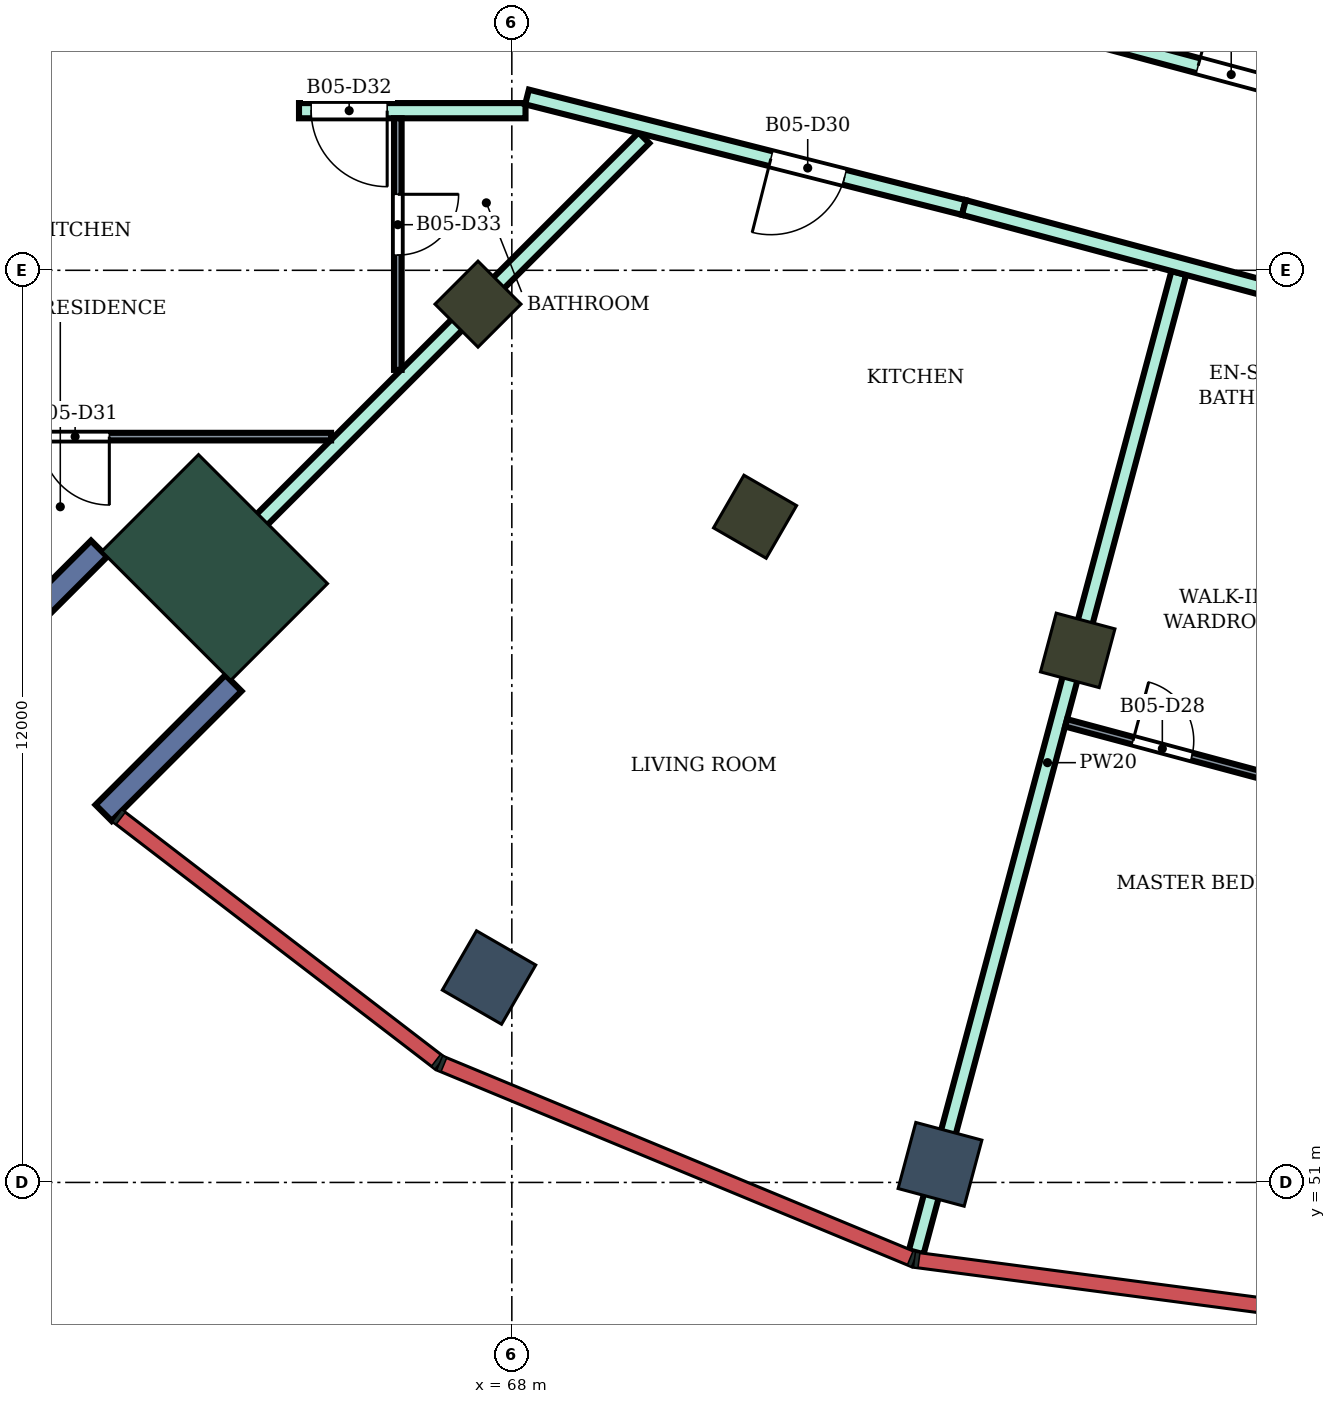
"""IFC4 building model, lengths in metres.
Left out: names, types, materials, properties, quantities, classifications, styles, units other than length and angle.
Written with IfcOpenShell. Run it as: python <this file> out.ifc"""

import sys

from ifc_helpers import new_model, si_unit, direction, frame, frame_2d, origin, origin_2d, place, context, subcontext, project, spatial, rectangle, extrude, element, fill, save


model = new_model("IFC4")
c1 = context("Model", 3, precision=1e-05, world=origin(), true_north=direction((0.0, 1.0)))
c2 = subcontext(c1, "Body", "Model", "MODEL_VIEW")
j1 = project(units=[si_unit("LENGTHUNIT", "METRE"), si_unit("PLANEANGLEUNIT", "RADIAN")], contexts=[c1])
p1 = place(None, origin())
s1 = spatial("IfcSite", under=j1, at=p1, CompositionType="ELEMENT")
p2 = place(p1, origin())
s2 = spatial("IfcBuilding", under=s1, at=p2, CompositionType="ELEMENT")
p3 = place(p2, frame((0.0, 0.0, 262.5)))
s3 = spatial("IfcBuildingStorey", under=s2, at=p3, CompositionType="ELEMENT", Elevation=262.5)
for number, where, z_axis, x_axis in (
    (1, (67.7, 53.696, 0.0), (0.0, 0.0, 1.0), (-0.5, -0.866, 0.0)),
    (2, (73.633, 51.238, 0.0), (0.0, 0.0, 1.0), (-0.259, -0.966, 0.0)),
):
    element("IfcColumn", number, at=place(p3, frame(where, z_axis=z_axis, x_axis=x_axis)), inside=s3, PredefinedType="COLUMN", context=c2, shape_type="SweptSolid", body=[
        extrude(rectangle(XDim=0.9, YDim=0.9, at=origin_2d()), origin(), (0.0, 0.0, 1.0), 4.2),
    ])
for number, where, z_axis, x_axis in (
    (3, (67.555, 62.555, 0.0), (0.0, 0.0, 1.0), (-0.707, -0.707, 0.0)),
    (4, (71.2, 59.758, 0.0), (0.0, 0.0, 1.0), (-0.5, -0.866, 0.0)),
    (5, (75.445, 58.0, 0.0), (0.0, 0.0, 1.0), (-0.259, -0.966, 0.0)),
):
    element("IfcColumn", number, at=place(p3, frame(where, z_axis=z_axis, x_axis=x_axis)), inside=s3, PredefinedType="COLUMN", context=c2, shape_type="SweptSolid", body=[
        extrude(rectangle(XDim=0.8, YDim=0.8, at=origin_2d()), origin(), (0.0, 0.0, 1.0), 4.2),
    ])
p4 = place(p3, frame((64.09, 59.09, 0.0), z_axis=(0.0, 0.0, 1.0), x_axis=(-0.707106781187, -0.707106781187, 0.0)))
e6 = element("IfcColumn", 6, at=p4, inside=s3, PredefinedType="COLUMN", context=c2, shape_type="SweptSolid", body=[
    extrude(rectangle(XDim=1.8, YDim=2.4, at=origin_2d()), origin(), (0.0, 0.0, 1.0), 4.2),
])
for number, where, z_axis, x_axis in (
    (7, (62.57, 59.338, 0.0), (0.0, 0.0, 1.0), (-0.707, -0.707, 0.0)),
    (8, (64.338, 57.57, 0.0), (0.0, 0.0, 1.0), (-0.707, -0.707, 0.0)),
):
    element("IfcWall", number, at=place(p3, frame(where, z_axis=z_axis, x_axis=x_axis)), inside=s3, PredefinedType="NOTDEFINED", context=c2, shape_type="SweptSolid", body=[
        extrude(rectangle(XDim=2.416, YDim=0.3, at=frame_2d((1.208, 0.0))), origin(), (0.0, 0.0, 1.0), 4.2),
    ])
p5 = place(p3, frame((63.592, 58.6, 0.0), z_axis=(0.0, 0.0, 1.0), x_axis=(0.707261286313, 0.706952242293, 0.0)))
e9 = element("IfcWall", 9, at=p5, inside=s3, PredefinedType="PARTITIONING", context=c2, shape_type="SweptSolid", body=[
    extrude(rectangle(XDim=8.69, YDim=0.2, at=frame_2d((4.345, 0.0))), origin(), (0.0, 0.0, 1.0), 3.75),
])
p6 = place(p3, frame((65.2, 65.1, 0.0), z_axis=(0.0, 0.0, 1.0), x_axis=(1.0, 0.0, 0.0)))
e10 = element("IfcWall", 10, at=p6, inside=s3, PredefinedType="PARTITIONING", context=c2, shape_type="SweptSolid", body=[
    extrude(rectangle(XDim=2.98, YDim=0.2, at=frame_2d((1.49, 0.0))), origin(), (0.0, 0.0, 1.0), 3.75),
])
p7 = place(p6, frame((0.16, 0.0, 0.0)))
e11 = element("IfcOpeningElement", 11, at=p7, cuts=e10, PredefinedType="OPENING", context=c2, shape_type="SweptSolid", body=[
    extrude(rectangle(XDim=1.0, YDim=2.1, at=frame_2d((0.5, 1.05))), frame((0.0, 0.11, 0.0), z_axis=(0.0, -1.0, 0.0), x_axis=(1.0, 0.0, 0.0)), (0.0, 0.0, 1.0), 0.22),
])
p8 = place(p3, frame((68.2, 65.28, 0.0), z_axis=(0.0, 0.0, 1.0), x_axis=(0.969428528216, -0.245373854926, 0.0)))
e12 = element("IfcWall", 12, at=p8, inside=s3, PredefinedType="PARTITIONING", context=c2, shape_type="SweptSolid", body=[
    extrude(rectangle(XDim=5.928, YDim=0.2, at=frame_2d((2.964, 0.0))), origin(), (0.0, 0.0, 1.0), 3.75),
])
p9 = place(p8, frame((3.309, 0.0, 0.0)))
e13 = element("IfcOpeningElement", 13, at=p9, cuts=e12, PredefinedType="OPENING", context=c2, shape_type="SweptSolid", body=[
    extrude(rectangle(XDim=1.0, YDim=2.1, at=frame_2d((0.5, 1.05))), frame((0.0, 0.11, 0.0), z_axis=(0.0, -1.0, 0.0), x_axis=(1.0, 0.0, 0.0)), (0.0, 0.0, 1.0), 0.22),
])
p10 = place(p3, frame((73.32, 50.082, 0.0), z_axis=(0.0, 0.0, 1.0), x_axis=(0.258966962665, 0.965886179758, 0.0)))
e14 = element("IfcWall", 14, at=p10, inside=s3, PredefinedType="PARTITIONING", context=c2, shape_type="SweptSolid", body=[
    extrude(rectangle(XDim=13.337, YDim=0.2, at=frame_2d((6.668, 0.0))), origin(), (0.0, 0.0, 1.0), 3.75),
])
p11 = place(p3, frame((73.947, 63.826, 0.0), z_axis=(0.0, 0.0, 1.0), x_axis=(0.965856500469, -0.259077634122, 0.0)))
e15 = element("IfcWall", 15, at=p11, inside=s3, PredefinedType="PARTITIONING", context=c2, shape_type="SweptSolid", body=[
    extrude(rectangle(XDim=6.217, YDim=0.2, at=frame_2d((3.108, 0.0))), origin(), (0.0, 0.0, 1.0), 3.75),
])
p12 = place(p3, frame((74.603, 66.342, 0.0), z_axis=(0.0, 0.0, 1.0), x_axis=(0.965920893652, -0.258837453254, 0.0)))
e16 = element("IfcWall", 16, at=p12, inside=s3, PredefinedType="PARTITIONING", context=c2, shape_type="SweptSolid", body=[
    extrude(rectangle(XDim=5.458, YDim=0.2, at=frame_2d((2.729, 0.0))), origin(), (0.0, 0.0, 1.0), 3.75),
])
p13 = place(p12, frame((2.512, 0.0, 0.0)))
e17 = element("IfcOpeningElement", 17, at=p13, cuts=e16, PredefinedType="OPENING", context=c2, shape_type="SweptSolid", body=[
    extrude(rectangle(XDim=0.9, YDim=2.1, at=frame_2d((0.45, 1.05))), frame((0.0, 0.11, 0.0), z_axis=(0.0, -1.0, 0.0), x_axis=(1.0, 0.0, 0.0)), (0.0, 0.0, 1.0), 0.22),
])
p14 = place(p3, frame((58.6, 60.812, 0.0), z_axis=(0.0, 0.0, 1.0), x_axis=(1.0, 0.0, 0.0)))
e18 = element("IfcWall", 18, at=p14, inside=s3, PredefinedType="PARTITIONING", context=c2, shape_type="SweptSolid", body=[
    extrude(rectangle(XDim=7.022, YDim=0.1, at=frame_2d((3.511, 0.0))), origin(), (0.0, 0.0, 1.0), 3.75),
])
p15 = place(p14, frame((3.205, 0.0, 0.0)))
e19 = element("IfcOpeningElement", 19, at=p15, cuts=e18, PredefinedType="OPENING", context=c2, shape_type="SweptSolid", body=[
    extrude(rectangle(XDim=0.9, YDim=2.1, at=frame_2d((0.45, 1.05))), frame((0.0, 0.06, 0.0), z_axis=(0.0, -1.0, 0.0), x_axis=(1.0, 0.0, 0.0)), (0.0, 0.0, 1.0), 0.12),
])
p16 = place(p3, frame((66.5, 61.69, 0.0), z_axis=(0.0, 0.0, 1.0), x_axis=(0.0, 1.0, 0.0)))
e20 = element("IfcWall", 20, at=p16, inside=s3, PredefinedType="PARTITIONING", context=c2, shape_type="SweptSolid", body=[
    extrude(rectangle(XDim=3.31, YDim=0.1, at=frame_2d((1.655, 0.0))), origin(), (0.0, 0.0, 1.0), 3.75),
])
p17 = place(p16, frame((1.51, 0.0, 0.0)))
e21 = element("IfcOpeningElement", 21, at=p17, cuts=e20, PredefinedType="OPENING", context=c2, shape_type="SweptSolid", body=[
    extrude(rectangle(XDim=0.8, YDim=2.1, at=frame_2d((0.4, 1.05))), frame((0.0, 0.06, 0.0), z_axis=(0.0, -1.0, 0.0), x_axis=(1.0, 0.0, 0.0)), (0.0, 0.0, 1.0), 0.12),
])
p18 = place(p3, frame((75.293, 57.046, 0.0), z_axis=(0.0, 0.0, 1.0), x_axis=(0.965904119246, -0.258900043306, 0.0)))
e22 = element("IfcWall", 22, at=p18, inside=s3, PredefinedType="PARTITIONING", context=c2, shape_type="SweptSolid", body=[
    extrude(rectangle(XDim=4.813, YDim=0.1, at=frame_2d((2.406, 0.0))), origin(), (0.0, 0.0, 1.0), 3.75),
])
p19 = place(p18, frame((0.91, 0.0, 0.0)))
e23 = element("IfcOpeningElement", 23, at=p19, cuts=e22, PredefinedType="OPENING", context=c2, shape_type="SweptSolid", body=[
    extrude(rectangle(XDim=0.8, YDim=2.1, at=frame_2d((0.4, 1.05))), frame((0.0, 0.06, 0.0), z_axis=(0.0, -1.0, 0.0), x_axis=(1.0, 0.0, 0.0)), (0.0, 0.0, 1.0), 0.12),
])
p20 = place(p18, frame((3.227, 0.0, 0.0)))
e24 = element("IfcOpeningElement", 24, at=p20, cuts=e22, PredefinedType="OPENING", context=c2, shape_type="SweptSolid", body=[
    extrude(rectangle(XDim=0.8, YDim=2.1, at=frame_2d((0.4, 1.05))), frame((0.0, 0.06, 0.0), z_axis=(0.0, -1.0, 0.0), x_axis=(1.0, 0.0, 0.0)), (0.0, 0.0, 1.0), 0.12),
])
p21 = place(p19, origin())
e25 = element("IfcDoor", 25, at=p21, inside=s3, OperationType="SINGLE_SWING_LEFT", PredefinedType="DOOR", context=c2, shape_type="SweptSolid", body=[
    extrude(rectangle(XDim=0.8, YDim=2.1, at=frame_2d((0.4, 1.05))), frame((0.0, 0.025, 0.0), z_axis=(0.0, -1.0, 0.0), x_axis=(1.0, 0.0, 0.0)), (0.0, 0.0, 1.0), 0.05),
])
fill(e23, e25)
p22 = place(p9, frame((1.0, 0.0, 0.0), z_axis=(0.0, 0.0, 1.0), x_axis=(-1.0, 0.0, 0.0)))
e26 = element("IfcDoor", 26, at=p22, inside=s3, OperationType="SINGLE_SWING_RIGHT", PredefinedType="DOOR", context=c2, shape_type="SweptSolid", body=[
    extrude(rectangle(XDim=1.0, YDim=2.1, at=frame_2d((0.5, 1.05))), frame((0.0, 0.025, 0.0), z_axis=(0.0, -1.0, 0.0), x_axis=(1.0, 0.0, 0.0)), (0.0, 0.0, 1.0), 0.05),
])
fill(e13, e26)
p23 = place(p15, frame((0.9, 0.0, 0.0), z_axis=(0.0, 0.0, 1.0), x_axis=(-1.0, 0.0, 0.0)))
e27 = element("IfcDoor", 27, at=p23, inside=s3, OperationType="SINGLE_SWING_LEFT", PredefinedType="DOOR", context=c2, shape_type="SweptSolid", body=[
    extrude(rectangle(XDim=0.9, YDim=2.1, at=frame_2d((0.45, 1.05))), frame((0.0, 0.025, 0.0), z_axis=(0.0, -1.0, 0.0), x_axis=(1.0, 0.0, 0.0)), (0.0, 0.0, 1.0), 0.05),
])
fill(e19, e27)
p24 = place(p7, frame((1.0, 0.0, 0.0), z_axis=(0.0, 0.0, 1.0), x_axis=(-1.0, 0.0, 0.0)))
e28 = element("IfcDoor", 28, at=p24, inside=s3, OperationType="SINGLE_SWING_LEFT", PredefinedType="DOOR", context=c2, shape_type="SweptSolid", body=[
    extrude(rectangle(XDim=1.0, YDim=2.1, at=frame_2d((0.5, 1.05))), frame((0.0, 0.025, 0.0), z_axis=(0.0, -1.0, 0.0), x_axis=(1.0, 0.0, 0.0)), (0.0, 0.0, 1.0), 0.05),
])
fill(e11, e28)
p25 = place(p17, frame((0.8, 0.0, 0.0), z_axis=(0.0, 0.0, 1.0), x_axis=(-1.0, 0.0, 0.0)))
e29 = element("IfcDoor", 29, at=p25, inside=s3, OperationType="SINGLE_SWING_LEFT", PredefinedType="DOOR", context=c2, shape_type="SweptSolid", body=[
    extrude(rectangle(XDim=0.8, YDim=2.1, at=frame_2d((0.4, 1.05))), frame((0.0, 0.025, 0.0), z_axis=(0.0, -1.0, 0.0), x_axis=(1.0, 0.0, 0.0)), (0.0, 0.0, 1.0), 0.05),
])
fill(e21, e29)
p26 = place(p13, origin())
e30 = element("IfcDoor", 30, at=p26, inside=s3, OperationType="SINGLE_SWING_LEFT", PredefinedType="DOOR", context=c2, shape_type="SweptSolid", body=[
    extrude(rectangle(XDim=0.9, YDim=2.1, at=frame_2d((0.45, 1.05))), frame((0.0, 0.025, 0.0), z_axis=(0.0, -1.0, 0.0), x_axis=(1.0, 0.0, 0.0)), (0.0, 0.0, 1.0), 0.05),
])
fill(e17, e30)
save(model, sys.argv[1])
